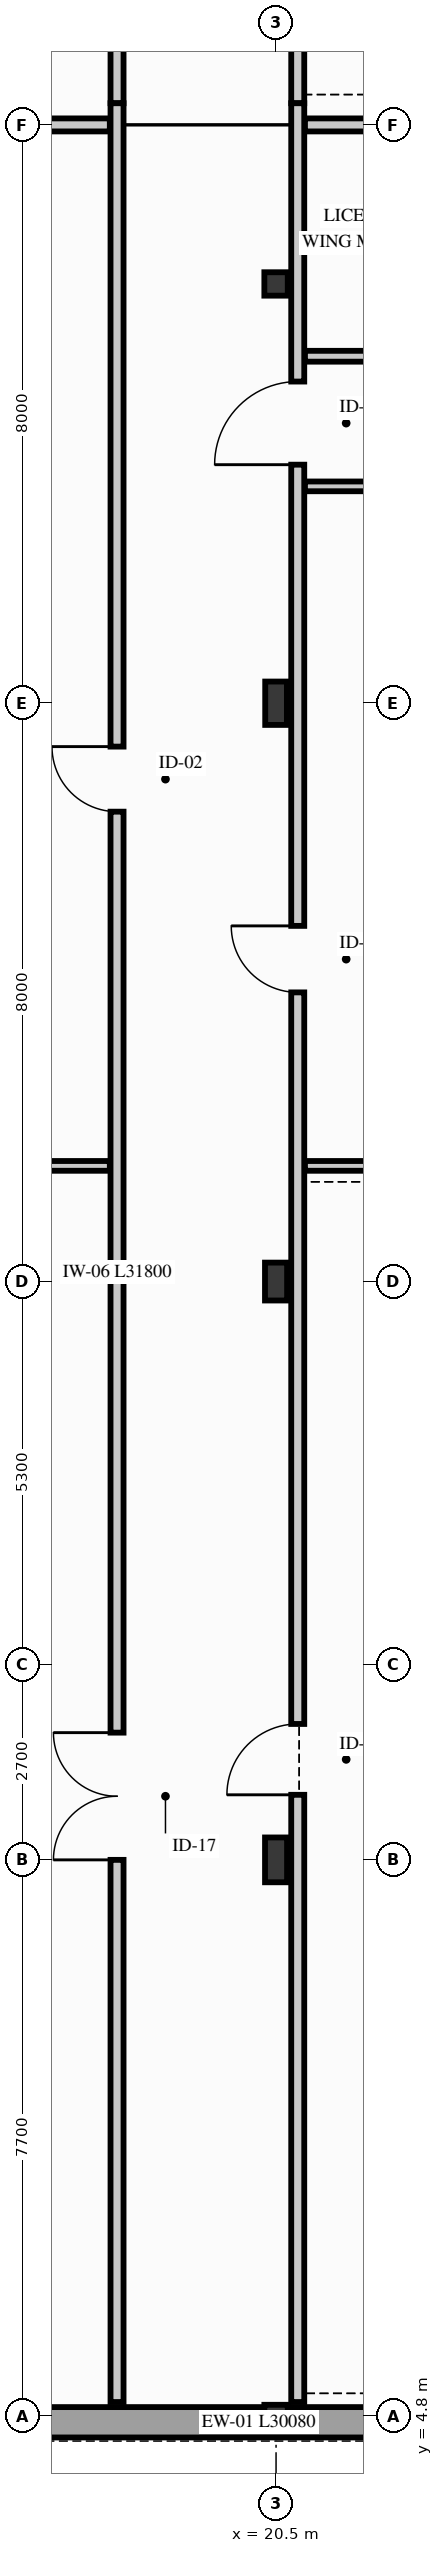
"""IFC4 building model, lengths in metres.
Left out: names, types, materials, properties, quantities, classifications, styles, units other than length and angle.
Written with IfcOpenShell. Run it as: python <this file> out.ifc"""

import sys

from ifc_helpers import new_model, si_unit, direction, frame, frame_2d, origin, origin_2d, place, context, subcontext, project, spatial, rectangle, hollow_circle, i_section, extrude, element, fill, save


model = new_model("IFC4")
c1 = context("Model", 3, precision=1e-05, world=origin(), true_north=direction((0.0, 1.0)))
c2 = subcontext(c1, "Body", "Model", "MODEL_VIEW")
j1 = project(units=[si_unit("LENGTHUNIT", "METRE"), si_unit("PLANEANGLEUNIT", "RADIAN")], contexts=[c1])
p1 = place(None, origin())
s1 = spatial("IfcSite", under=j1, at=p1, CompositionType="ELEMENT")
p2 = place(p1, origin())
s2 = spatial("IfcBuilding", under=s1, at=p2, CompositionType="ELEMENT")
p3 = place(p2, frame((0.0, 0.0, 5.1)))
s3 = spatial("IfcBuildingStorey", under=s2, at=p3, CompositionType="ELEMENT", Elevation=5.1)
p4 = place(p3, frame((20.5, 4.8, 0.0), z_axis=(0.0, 0.0, 1.0), x_axis=(1.0, 0.0, 0.0)))
e1 = element("IfcColumn", 1, at=p4, inside=s3, PredefinedType="COLUMN", context=c2, shape_type="SweptSolid", body=[
    extrude(hollow_circle(Radius=0.162, WallThickness=0.016, at=origin_2d()), origin(), (0.0, 0.0, 1.0), 4.2),
])
p5 = place(p3, frame((20.5, 12.5, 0.0), z_axis=(0.0, 0.0, 1.0), x_axis=(1.0, 0.0, 0.0)))
e2 = element("IfcColumn", 2, at=p5, inside=s3, PredefinedType="COLUMN", context=c2, shape_type="SweptSolid", body=[
    extrude(i_section(OverallWidth=0.305, OverallDepth=0.62, WebThickness=0.021, FlangeThickness=0.04, FilletRadius=0.027, at=origin_2d()), origin(), (0.0, 0.0, 1.0), 4.2),
])
p6 = place(p3, frame((20.5, 20.5, 0.0), z_axis=(0.0, 0.0, 1.0), x_axis=(1.0, 0.0, 0.0)))
e3 = element("IfcColumn", 3, at=p6, inside=s3, PredefinedType="COLUMN", context=c2, shape_type="SweptSolid", body=[
    extrude(i_section(OverallWidth=0.306, OverallDepth=0.524, WebThickness=0.021, FlangeThickness=0.04, FilletRadius=0.027, at=origin_2d()), origin(), (0.0, 0.0, 1.0), 4.2),
])
p7 = place(p3, frame((20.5, 28.5, 0.0), z_axis=(0.0, 0.0, 1.0), x_axis=(1.0, 0.0, 0.0)))
e4 = element("IfcColumn", 4, at=p7, inside=s3, PredefinedType="COLUMN", context=c2, shape_type="SweptSolid", body=[
    extrude(i_section(OverallWidth=0.3, OverallDepth=0.6, WebThickness=0.015, FlangeThickness=0.03, FilletRadius=0.027, at=origin_2d()), origin(), (0.0, 0.0, 1.0), 4.2),
])
p8 = place(p3, frame((20.5, 34.3, 0.0), z_axis=(0.0, 0.0, 1.0), x_axis=(1.0, 0.0, 0.0)))
e5 = element("IfcColumn", 5, at=p8, inside=s3, PredefinedType="COLUMN", context=c2, shape_type="SweptSolid", body=[
    extrude(hollow_circle(Radius=0.162, WallThickness=0.016, at=origin_2d()), origin(), (0.0, 0.0, 1.0), 4.2),
])
p9 = place(p3, frame((4.51, 4.72, 0.0), z_axis=(0.0, 0.0, 1.0), x_axis=(1.0, 0.0, 0.0)))
e6 = element("IfcWall", 6, at=p9, inside=s3, PredefinedType="SOLIDWALL", context=c2, shape_type="SweptSolid", body=[
    extrude(rectangle(XDim=30.08, YDim=0.42, at=frame_2d((15.04, 0.0))), origin(), (0.0, 0.0, 1.0), 3.68),
])
p10 = place(p9, frame((1.65, 0.0, 0.85)))
e7 = element("IfcOpeningElement", 7, at=p10, cuts=e6, PredefinedType="OPENING", context=c2, shape_type="SweptSolid", body=[
    extrude(rectangle(XDim=1.3, YDim=2.15, at=frame_2d((0.65, 1.075))), frame((0.0, 0.22, 0.0), z_axis=(0.0, -1.0, 0.0), x_axis=(1.0, 0.0, 0.0)), (0.0, 0.0, 1.0), 0.44),
])
p11 = place(p9, frame((5.45, 0.0, 0.84)))
e8 = element("IfcOpeningElement", 8, at=p11, cuts=e6, PredefinedType="OPENING", context=c2, shape_type="SweptSolid", body=[
    extrude(rectangle(XDim=1.5, YDim=2.3, at=frame_2d((0.75, 1.15))), frame((0.0, 0.22, 0.0), z_axis=(0.0, -1.0, 0.0), x_axis=(1.0, 0.0, 0.0)), (0.0, 0.0, 1.0), 0.44),
])
p12 = place(p9, frame((9.25, 0.0, 0.74)))
e9 = element("IfcOpeningElement", 9, at=p12, cuts=e6, PredefinedType="OPENING", context=c2, shape_type="SweptSolid", body=[
    extrude(rectangle(XDim=1.6, YDim=2.4, at=frame_2d((0.8, 1.2))), frame((0.0, 0.22, 0.0), z_axis=(0.0, -1.0, 0.0), x_axis=(1.0, 0.0, 0.0)), (0.0, 0.0, 1.0), 0.44),
])
p13 = place(p9, frame((20.65, 0.0, 0.74)))
e10 = element("IfcOpeningElement", 10, at=p13, cuts=e6, PredefinedType="OPENING", context=c2, shape_type="SweptSolid", body=[
    extrude(rectangle(XDim=1.8, YDim=2.4, at=frame_2d((0.9, 1.2))), frame((0.0, 0.22, 0.0), z_axis=(0.0, -1.0, 0.0), x_axis=(1.0, 0.0, 0.0)), (0.0, 0.0, 1.0), 0.44),
])
p14 = place(p3, frame((18.3, 36.8, 0.0), z_axis=(0.0, 0.0, 1.0), x_axis=(0.0, 1.0, 0.0)))
e11 = element("IfcWall", 11, at=p14, inside=s3, PredefinedType="PARTITIONING", context=c2, shape_type="SweptSolid", body=[
    extrude(rectangle(XDim=35.95, YDim=0.18, at=frame_2d((17.975, 0.0))), origin(), (0.0, 0.0, 1.0), 3.658),
])
p15 = place(p14, frame((7.0, 0.0, 0.0)))
e12 = element("IfcOpeningElement", 12, at=p15, cuts=e11, PredefinedType="OPENING", context=c2, shape_type="SweptSolid", body=[
    extrude(rectangle(XDim=1.02, YDim=2.18, at=frame_2d((0.51, 1.09))), frame((0.0, 0.1, 0.0), z_axis=(0.0, -1.0, 0.0), x_axis=(1.0, 0.0, 0.0)), (0.0, 0.0, 1.0), 0.2),
])
p16 = place(p14, frame((22.0, 0.0, 0.0)))
e13 = element("IfcOpeningElement", 13, at=p16, cuts=e11, PredefinedType="OPENING", context=c2, shape_type="SweptSolid", body=[
    extrude(rectangle(XDim=1.05, YDim=2.2, at=frame_2d((0.525, 1.1))), frame((0.0, 0.1, 0.0), z_axis=(0.0, -1.0, 0.0), x_axis=(1.0, 0.0, 0.0)), (0.0, 0.0, 1.0), 0.2),
])
p17 = place(p3, frame((20.8, 36.8, 0.0), z_axis=(0.0, 0.0, 1.0), x_axis=(0.0, 1.0, 0.0)))
e14 = element("IfcWall", 14, at=p17, inside=s3, PredefinedType="PARTITIONING", context=c2, shape_type="SweptSolid", body=[
    extrude(rectangle(XDim=38.05, YDim=0.18, at=frame_2d((19.025, 0.0))), origin(), (0.0, 0.0, 1.0), 3.658),
])
p18 = place(p17, frame((5.65, 0.0, 0.0)))
e15 = element("IfcOpeningElement", 15, at=p18, cuts=e14, PredefinedType="OPENING", context=c2, shape_type="SweptSolid", body=[
    extrude(rectangle(XDim=1.08, YDim=2.22, at=frame_2d((0.54, 1.11))), frame((0.0, 0.1, 0.0), z_axis=(0.0, -1.0, 0.0), x_axis=(1.0, 0.0, 0.0)), (0.0, 0.0, 1.0), 0.2),
])
p19 = place(p17, frame((20.0, 0.0, 0.0)))
e16 = element("IfcOpeningElement", 16, at=p19, cuts=e14, PredefinedType="OPENING", context=c2, shape_type="SweptSolid", body=[
    extrude(rectangle(XDim=1.05, YDim=2.2, at=frame_2d((0.525, 1.1))), frame((0.0, 0.1, 0.0), z_axis=(0.0, -1.0, 0.0), x_axis=(1.0, 0.0, 0.0)), (0.0, 0.0, 1.0), 0.2),
])
p20 = place(p3, frame((18.3, 5.0, 0.0), z_axis=(0.0, 0.0, 1.0), x_axis=(0.0, 1.0, 0.0)))
e17 = element("IfcWall", 17, at=p20, inside=s3, PredefinedType="PARTITIONING", context=c2, shape_type="SweptSolid", body=[
    extrude(rectangle(XDim=31.8, YDim=0.18, at=frame_2d((15.9, 0.0))), origin(), (0.0, 0.0, 1.0), 3.678),
])
p21 = place(p20, frame((7.5, 0.0, 0.0)))
e18 = element("IfcOpeningElement", 18, at=p21, cuts=e17, PredefinedType="OPENING", context=c2, shape_type="SweptSolid", body=[
    extrude(rectangle(XDim=1.76, YDim=2.36, at=frame_2d((0.88, 1.18))), frame((0.0, 0.1, 0.0), z_axis=(0.0, -1.0, 0.0), x_axis=(1.0, 0.0, 0.0)), (0.0, 0.0, 1.0), 0.2),
])
p22 = place(p20, frame((22.0, 0.0, 0.0)))
e19 = element("IfcOpeningElement", 19, at=p22, cuts=e17, PredefinedType="OPENING", context=c2, shape_type="SweptSolid", body=[
    extrude(rectangle(XDim=0.9, YDim=2.1, at=frame_2d((0.45, 1.05))), frame((0.0, 0.1, 0.0), z_axis=(0.0, -1.0, 0.0), x_axis=(1.0, 0.0, 0.0)), (0.0, 0.0, 1.0), 0.2),
])
p23 = place(p3, frame((20.8, 5.0, 0.0), z_axis=(0.0, 0.0, 1.0), x_axis=(0.0, 1.0, 0.0)))
e20 = element("IfcWall", 20, at=p23, inside=s3, PredefinedType="PARTITIONING", context=c2, shape_type="SweptSolid", body=[
    extrude(rectangle(XDim=31.8, YDim=0.18, at=frame_2d((15.9, 0.0))), origin(), (0.0, 0.0, 1.0), 3.678),
])
p24 = place(p23, frame((8.4, 0.0, 0.0)))
e21 = element("IfcOpeningElement", 21, at=p24, cuts=e20, PredefinedType="OPENING", context=c2, shape_type="SweptSolid", body=[
    extrude(rectangle(XDim=0.98, YDim=2.16, at=frame_2d((0.49, 1.08))), frame((0.0, 0.1, 0.0), z_axis=(0.0, -1.0, 0.0), x_axis=(1.0, 0.0, 0.0)), (0.0, 0.0, 1.0), 0.2),
])
p25 = place(p23, frame((19.5, 0.0, 0.0)))
e22 = element("IfcOpeningElement", 22, at=p25, cuts=e20, PredefinedType="OPENING", context=c2, shape_type="SweptSolid", body=[
    extrude(rectangle(XDim=0.92, YDim=2.12, at=frame_2d((0.46, 1.06))), frame((0.0, 0.1, 0.0), z_axis=(0.0, -1.0, 0.0), x_axis=(1.0, 0.0, 0.0)), (0.0, 0.0, 1.0), 0.2),
])
p26 = place(p23, frame((26.8, 0.0, 0.0)))
e23 = element("IfcOpeningElement", 23, at=p26, cuts=e20, PredefinedType="OPENING", context=c2, shape_type="SweptSolid", body=[
    extrude(rectangle(XDim=1.15, YDim=2.2, at=frame_2d((0.575, 1.1))), frame((0.0, 0.1, 0.0), z_axis=(0.0, -1.0, 0.0), x_axis=(1.0, 0.0, 0.0)), (0.0, 0.0, 1.0), 0.2),
])
p27 = place(p3, frame((5.0, 36.5, 0.0), z_axis=(0.0, 0.0, 1.0), x_axis=(1.0, 0.0, 0.0)))
e24 = element("IfcWall", 24, at=p27, inside=s3, PredefinedType="PARTITIONING", context=c2, shape_type="SweptSolid", body=[
    extrude(rectangle(XDim=13.2, YDim=0.18, at=frame_2d((6.6, 0.0))), origin(), (0.0, 0.0, 1.0), 3.92),
])
p28 = place(p3, frame((20.9, 36.5, 0.0), z_axis=(0.0, 0.0, 1.0), x_axis=(1.0, 0.0, 0.0)))
e25 = element("IfcWall", 25, at=p28, inside=s3, PredefinedType="PARTITIONING", context=c2, shape_type="SweptSolid", body=[
    extrude(rectangle(XDim=7.15, YDim=0.18, at=frame_2d((3.575, 0.0))), origin(), (0.0, 0.0, 1.0), 3.92),
])
p29 = place(p3, frame((5.0, 22.1, 0.0), z_axis=(0.0, 0.0, 1.0), x_axis=(1.0, 0.0, 0.0)))
e26 = element("IfcWall", 26, at=p29, inside=s3, PredefinedType="PARTITIONING", context=c2, shape_type="SweptSolid", body=[
    extrude(rectangle(XDim=13.2, YDim=0.135, at=frame_2d((6.6, 0.0))), origin(), (0.0, 0.0, 1.0), 3.578),
])
p30 = place(p3, frame((20.9, 22.1, 0.0), z_axis=(0.0, 0.0, 1.0), x_axis=(1.0, 0.0, 0.0)))
e27 = element("IfcWall", 27, at=p30, inside=s3, PredefinedType="PARTITIONING", context=c2, shape_type="SweptSolid", body=[
    extrude(rectangle(XDim=13.25, YDim=0.135, at=frame_2d((6.625, 0.0))), origin(), (0.0, 0.0, 1.0), 3.578),
])
p31 = place(p3, frame((20.9, 33.3, 0.0), z_axis=(0.0, 0.0, 1.0), x_axis=(1.0, 0.0, 0.0)))
e28 = element("IfcWall", 28, at=p31, inside=s3, PredefinedType="PARTITIONING", context=c2, shape_type="SweptSolid", body=[
    extrude(rectangle(XDim=13.25, YDim=0.15, at=frame_2d((6.625, 0.0))), origin(), (0.0, 0.0, 1.0), 3.578),
])
p32 = place(p31, frame((1.5, 0.0, 0.0)))
e29 = element("IfcOpeningElement", 29, at=p32, cuts=e28, PredefinedType="OPENING", context=c2, shape_type="SweptSolid", body=[
    extrude(rectangle(XDim=0.88, YDim=2.1, at=frame_2d((0.44, 1.05))), frame((0.0, 0.085, 0.0), z_axis=(0.0, -1.0, 0.0), x_axis=(1.0, 0.0, 0.0)), (0.0, 0.0, 1.0), 0.17),
])
p33 = place(p31, frame((5.8, 0.0, 0.0)))
e30 = element("IfcOpeningElement", 30, at=p33, cuts=e28, PredefinedType="OPENING", context=c2, shape_type="SweptSolid", body=[
    extrude(rectangle(XDim=0.9, YDim=2.1, at=frame_2d((0.45, 1.05))), frame((0.0, 0.085, 0.0), z_axis=(0.0, -1.0, 0.0), x_axis=(1.0, 0.0, 0.0)), (0.0, 0.0, 1.0), 0.17),
])
p34 = place(p31, frame((10.2, 0.0, 0.0)))
e31 = element("IfcOpeningElement", 31, at=p34, cuts=e28, PredefinedType="OPENING", context=c2, shape_type="SweptSolid", body=[
    extrude(rectangle(XDim=0.95, YDim=2.15, at=frame_2d((0.475, 1.075))), frame((0.0, 0.085, 0.0), z_axis=(0.0, -1.0, 0.0), x_axis=(1.0, 0.0, 0.0)), (0.0, 0.0, 1.0), 0.17),
])
p35 = place(p3, frame((20.9, 31.5, 0.0), z_axis=(0.0, 0.0, 1.0), x_axis=(1.0, 0.0, 0.0)))
e32 = element("IfcWall", 32, at=p35, inside=s3, PredefinedType="PARTITIONING", context=c2, shape_type="SweptSolid", body=[
    extrude(rectangle(XDim=13.25, YDim=0.135, at=frame_2d((6.625, 0.0))), origin(), (0.0, 0.0, 1.0), 3.578),
])
p36 = place(p21, origin())
e33 = element("IfcDoor", 33, at=p36, inside=s3, OperationType="DOUBLE_DOOR_SINGLE_SWING", PredefinedType="DOOR", context=c2, shape_type="SweptSolid", body=[
    extrude(rectangle(XDim=1.76, YDim=2.36, at=frame_2d((0.88, 1.18))), frame((0.0, 0.025, 0.0), z_axis=(0.0, -1.0, 0.0), x_axis=(1.0, 0.0, 0.0)), (0.0, 0.0, 1.0), 0.05),
])
fill(e18, e33)
p37 = place(p22, origin())
e34 = element("IfcDoor", 34, at=p37, inside=s3, OperationType="SINGLE_SWING_RIGHT", PredefinedType="DOOR", context=c2, shape_type="SweptSolid", body=[
    extrude(rectangle(XDim=0.9, YDim=2.1, at=frame_2d((0.45, 1.05))), frame((0.0, 0.025, 0.0), z_axis=(0.0, -1.0, 0.0), x_axis=(1.0, 0.0, 0.0)), (0.0, 0.0, 1.0), 0.05),
])
fill(e19, e34)
p38 = place(p24, origin())
e35 = element("IfcDoor", 35, at=p38, inside=s3, OperationType="SINGLE_SWING_LEFT", PredefinedType="DOOR", context=c2, shape_type="SweptSolid", body=[
    extrude(rectangle(XDim=0.98, YDim=2.16, at=frame_2d((0.49, 1.08))), frame((0.0, 0.025, 0.0), z_axis=(0.0, -1.0, 0.0), x_axis=(1.0, 0.0, 0.0)), (0.0, 0.0, 1.0), 0.05),
])
fill(e21, e35)
p39 = place(p25, origin())
e36 = element("IfcDoor", 36, at=p39, inside=s3, OperationType="SINGLE_SWING_RIGHT", PredefinedType="DOOR", context=c2, shape_type="SweptSolid", body=[
    extrude(rectangle(XDim=0.92, YDim=2.12, at=frame_2d((0.46, 1.06))), frame((0.0, 0.025, 0.0), z_axis=(0.0, -1.0, 0.0), x_axis=(1.0, 0.0, 0.0)), (0.0, 0.0, 1.0), 0.05),
])
fill(e22, e36)
p40 = place(p26, origin())
e37 = element("IfcDoor", 37, at=p40, inside=s3, OperationType="SINGLE_SWING_LEFT", PredefinedType="DOOR", context=c2, shape_type="SweptSolid", body=[
    extrude(rectangle(XDim=1.15, YDim=2.2, at=frame_2d((0.575, 1.1))), frame((0.0, 0.025, 0.0), z_axis=(0.0, -1.0, 0.0), x_axis=(1.0, 0.0, 0.0)), (0.0, 0.0, 1.0), 0.05),
])
fill(e23, e37)
save(model, sys.argv[1])
